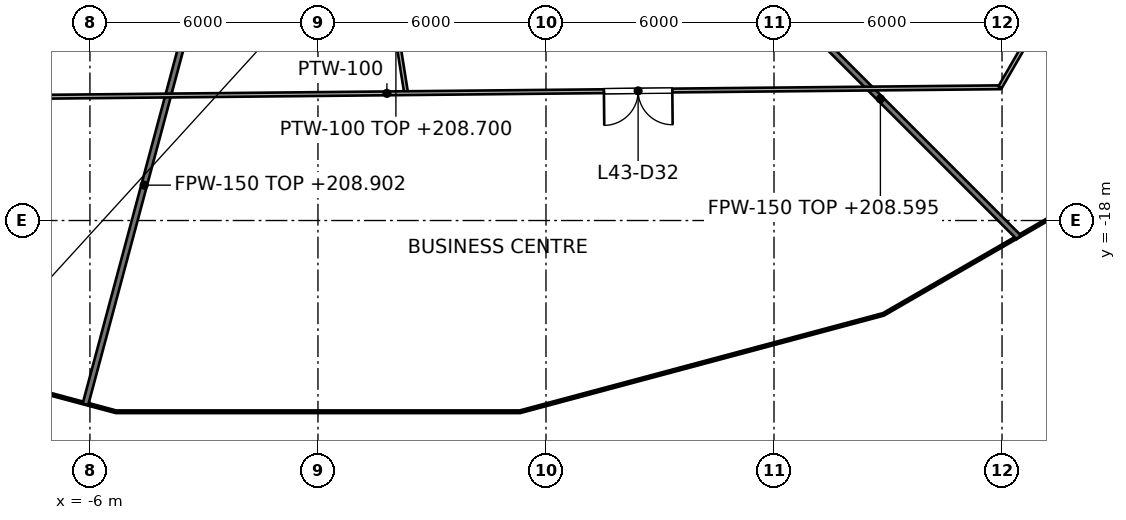
"""IFC4 building model, lengths in metres.
Left out: names, types, materials, properties, quantities, classifications, styles, units other than length and angle.
Written with IfcOpenShell. Run it as: python <this file> out.ifc"""

import sys

from ifc_helpers import new_model, si_unit, direction, frame, frame_2d, origin, place, context, subcontext, project, spatial, rectangle, extrude, element, fill, save


model = new_model("IFC4")
c1 = context("Model", 3, precision=1e-05, world=origin(), true_north=direction((0.0, 1.0)))
c2 = subcontext(c1, "Body", "Model", "MODEL_VIEW")
j1 = project(units=[si_unit("LENGTHUNIT", "METRE"), si_unit("PLANEANGLEUNIT", "RADIAN")], contexts=[c1])
p1 = place(None, origin())
s1 = spatial("IfcSite", under=j1, at=p1, CompositionType="ELEMENT")
p2 = place(p1, origin())
s2 = spatial("IfcBuilding", under=s1, at=p2, CompositionType="ELEMENT")
p3 = place(p2, frame((0.0, 0.0, 203.0)))
s3 = spatial("IfcBuildingStorey", under=s2, at=p3, CompositionType="ELEMENT", Elevation=203.0)
p4 = place(p3, frame((11.161, -11.161, 0.0), z_axis=(0.0, 0.0, 1.0), x_axis=(0.707106781187, -0.707106781187, 0.0)))
e1 = element("IfcWall", 1, at=p4, inside=s3, PredefinedType="PARTITIONING", context=c2, shape_type="SweptSolid", body=[
    extrude(rectangle(XDim=10.291, YDim=0.15, at=frame_2d((5.146, 0.0))), origin(), (0.0, 0.0, 1.0), 5.595),
])
p5 = place(p3, frame((-6.119, -22.837, 0.0), z_axis=(0.0, 0.0, 1.0), x_axis=(0.258861094582, 0.965914558184, 0.0)))
e2 = element("IfcWall", 2, at=p5, inside=s3, PredefinedType="PARTITIONING", context=c2, shape_type="SweptSolid", body=[
    extrude(rectangle(XDim=11.942, YDim=0.15, at=frame_2d((5.971, 0.0))), origin(), (0.0, 0.0, 1.0), 5.902),
])
p6 = place(p3, frame((1.782, -11.254, 0.0), z_axis=(0.0, 0.0, 1.0), x_axis=(0.156538808155, -0.987671808619, 0.0)))
e3 = element("IfcWall", 3, at=p6, inside=s3, PredefinedType="PARTITIONING", context=c2, shape_type="SweptSolid", body=[
    extrude(rectangle(XDim=3.438, YDim=0.1, at=frame_2d((1.719, 0.0))), origin(), (0.0, 0.0, 1.0), 5.7),
])
p7 = place(p3, frame((-14.32, -14.814, 0.0), z_axis=(0.0, 0.0, 1.0), x_axis=(0.999950809916, 0.009918555737, 0.0)))
e4 = element("IfcWall", 4, at=p7, inside=s3, PredefinedType="PARTITIONING", context=c2, shape_type="SweptSolid", body=[
    extrude(rectangle(XDim=32.27, YDim=0.1, at=frame_2d((16.135, 0.0))), origin(), (0.0, 0.0, 1.0), 5.527),
])
p8 = place(p7, frame((4.239, 0.0, 0.0)))
e5 = element("IfcOpeningElement", 5, at=p8, cuts=e4, PredefinedType="OPENING", context=c2, shape_type="SweptSolid", body=[
    extrude(rectangle(XDim=1.8, YDim=2.1, at=frame_2d((0.9, 1.05))), frame((0.0, 0.05, 0.0), z_axis=(0.0, -1.0, 0.0), x_axis=(1.0, 0.0, 0.0)), (0.0, 0.0, 1.0), 0.1),
])
p9 = place(p7, frame((21.845, 0.0, 0.0)))
e6 = element("IfcOpeningElement", 6, at=p9, cuts=e4, PredefinedType="OPENING", context=c2, shape_type="SweptSolid", body=[
    extrude(rectangle(XDim=1.8, YDim=2.1, at=frame_2d((0.9, 1.05))), frame((0.0, 0.05, 0.0), z_axis=(0.0, -1.0, 0.0), x_axis=(1.0, 0.0, 0.0)), (0.0, 0.0, 1.0), 0.1),
])
p10 = place(p3, frame((17.948, -14.494, 0.0), z_axis=(0.0, 0.0, 1.0), x_axis=(0.49994610202, 0.866056519561, 0.0)))
e7 = element("IfcWall", 7, at=p10, inside=s3, PredefinedType="PARTITIONING", context=c2, shape_type="SweptSolid", body=[
    extrude(rectangle(XDim=7.78, YDim=0.1, at=frame_2d((3.89, 0.0))), origin(), (0.0, 0.0, 1.0), 5.527),
])
p11 = place(p9, origin())
e8 = element("IfcDoor", 8, at=p11, inside=s3, OperationType="DOUBLE_DOOR_SINGLE_SWING", PredefinedType="DOOR", context=c2, shape_type="SweptSolid", body=[
    extrude(rectangle(XDim=1.8, YDim=2.1, at=frame_2d((0.9, 1.05))), frame((0.0, 0.025, 0.0), z_axis=(0.0, -1.0, 0.0), x_axis=(1.0, 0.0, 0.0)), (0.0, 0.0, 1.0), 0.05),
])
fill(e6, e8)
save(model, sys.argv[1])
